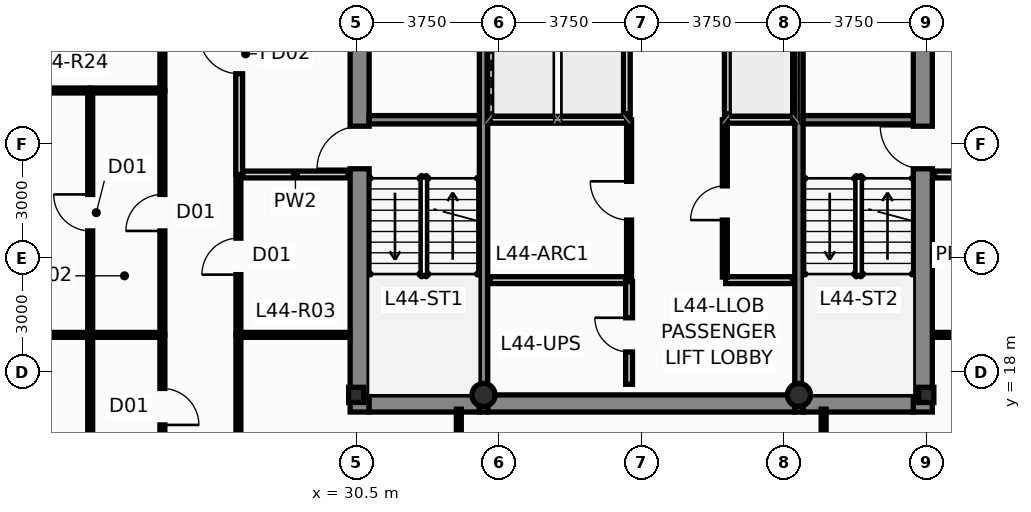
"""IFC4 building model, lengths in metres.
Left out: names, types, materials, properties, quantities, classifications, styles, units other than length and angle.
Written with IfcOpenShell. Run it as: python <this file> out.ifc"""

import sys

from ifc_helpers import new_model, si_unit, direction, frame, frame_2d, origin, origin_2d, place, context, subcontext, project, spatial, rectangle, hollow_circle, i_section, extrude, source, transform, mapped, element, fill, save


model = new_model("IFC4")
c1 = context("Model", 3, precision=1e-05, world=origin(), true_north=direction((0.0, 1.0)))
c2 = subcontext(c1, "Body", "Model", "MODEL_VIEW")
j1 = project(units=[si_unit("LENGTHUNIT", "METRE"), si_unit("PLANEANGLEUNIT", "RADIAN")], contexts=[c1])
p1 = place(None, origin())
s1 = spatial("IfcSite", under=j1, at=p1, CompositionType="ELEMENT")
p2 = place(p1, origin())
s2 = spatial("IfcBuilding", under=s1, at=p2, CompositionType="ELEMENT")
p3 = place(p2, frame((0.0, 0.0, 169.45)))
s3 = spatial("IfcBuildingStorey", under=s2, at=p3, CompositionType="ELEMENT", Elevation=169.45)
m1 = source(origin(), c2, "Body", "SweptSolid", [
    extrude(i_section(OverallWidth=0.4, OverallDepth=0.4, WebThickness=0.02, FlangeThickness=0.032, at=origin_2d()), origin(), (0.0, 0.0, 1.0), 3.65),
])
for number, where, z_axis, x_axis in (
    (1, (30.5, 17.4, 0.0), (0.0, 0.0, 1.0), (1.0, 0.0, 0.0)),
    (2, (45.5, 17.4, 0.0), (0.0, 0.0, 1.0), (1.0, 0.0, 0.0)),
):
    element("IfcColumn", number, at=place(p3, frame(where, z_axis=z_axis, x_axis=x_axis)), inside=s3, PredefinedType="COLUMN", context=c2, shape_type="MappedRepresentation", body=[
        mapped(m1, transform((0.0, 0.0, 0.0), scale=1.0)),
    ])
m2 = source(origin(), c2, "Body", "SweptSolid", [
    extrude(hollow_circle(Radius=0.305, WallThickness=0.025, at=origin_2d()), origin(), (0.0, 0.0, 1.0), 3.65),
])
for number, where, z_axis, x_axis in (
    (3, (33.85, 17.4, 0.0), (0.0, 0.0, 1.0), (1.0, 0.0, 0.0)),
    (4, (42.15, 17.4, 0.0), (0.0, 0.0, 1.0), (1.0, 0.0, 0.0)),
):
    element("IfcColumn", number, at=place(p3, frame(where, z_axis=z_axis, x_axis=x_axis)), inside=s3, PredefinedType="COLUMN", context=c2, shape_type="MappedRepresentation", body=[
        mapped(m2, transform((0.0, 0.0, 0.0), scale=1.0)),
    ])
p4 = place(p3, frame((30.59, 16.95, 0.0), z_axis=(0.0, 0.0, 1.0), x_axis=(0.0, 1.0, 0.0)))
e5 = element("IfcWall", 5, at=p4, inside=s3, PredefinedType="SHEAR", context=c2, shape_type="SweptSolid", body=[
    extrude(rectangle(XDim=13.275, YDim=0.5, at=frame_2d((6.638, 0.0))), origin(), (0.0, 0.0, 1.0), 3.65),
])
p5 = place(p4, frame((6.4, 0.0, 0.0)))
e6 = element("IfcOpeningElement", 6, at=p5, cuts=e5, PredefinedType="OPENING", context=c2, shape_type="SweptSolid", body=[
    extrude(rectangle(XDim=1.12, YDim=2.15, at=frame_2d((0.56, 1.075))), frame((0.0, 0.262, 0.0), z_axis=(0.0, -1.0, 0.0), x_axis=(1.0, 0.0, 0.0)), (0.0, 0.0, 1.0), 0.524),
])
p6 = place(p4, frame((10.85, 0.0, 0.0)))
e7 = element("IfcOpeningElement", 7, at=p6, cuts=e5, PredefinedType="OPENING", context=c2, shape_type="SweptSolid", body=[
    extrude(rectangle(XDim=1.2, YDim=2.2, at=frame_2d((0.6, 1.1))), frame((0.0, 0.262, 0.0), z_axis=(0.0, -1.0, 0.0), x_axis=(1.0, 0.0, 0.0)), (0.0, 0.0, 1.0), 0.524),
])
p7 = place(p3, frame((45.41, 16.95, 0.0), z_axis=(0.0, 0.0, 1.0), x_axis=(0.0, 1.0, 0.0)))
e8 = element("IfcWall", 8, at=p7, inside=s3, PredefinedType="SHEAR", context=c2, shape_type="SweptSolid", body=[
    extrude(rectangle(XDim=13.275, YDim=0.5, at=frame_2d((6.638, 0.0))), origin(), (0.0, 0.0, 1.0), 3.65),
])
p8 = place(p7, frame((6.4, 0.0, 0.0)))
e9 = element("IfcOpeningElement", 9, at=p8, cuts=e8, PredefinedType="OPENING", context=c2, shape_type="SweptSolid", body=[
    extrude(rectangle(XDim=1.12, YDim=2.15, at=frame_2d((0.56, 1.075))), frame((0.0, 0.262, 0.0), z_axis=(0.0, -1.0, 0.0), x_axis=(1.0, 0.0, 0.0)), (0.0, 0.0, 1.0), 0.524),
])
p9 = place(p7, frame((10.85, 0.0, 0.0)))
e10 = element("IfcOpeningElement", 10, at=p9, cuts=e8, PredefinedType="OPENING", context=c2, shape_type="SweptSolid", body=[
    extrude(rectangle(XDim=1.2, YDim=2.2, at=frame_2d((0.6, 1.1))), frame((0.0, 0.262, 0.0), z_axis=(0.0, -1.0, 0.0), x_axis=(1.0, 0.0, 0.0)), (0.0, 0.0, 1.0), 0.524),
])
p10 = place(p3, frame((30.84, 17.175, 0.0), z_axis=(0.0, 0.0, 1.0), x_axis=(1.0, 0.0, 0.0)))
e11 = element("IfcWall", 11, at=p10, inside=s3, PredefinedType="SHEAR", context=c2, shape_type="SweptSolid", body=[
    extrude(rectangle(XDim=2.9, YDim=0.45, at=frame_2d((1.45, 0.0))), origin(), (0.0, 0.0, 1.0), 3.65),
])
p11 = place(p3, frame((33.96, 17.175, 0.0), z_axis=(0.0, 0.0, 1.0), x_axis=(1.0, 0.0, 0.0)))
e12 = element("IfcWall", 12, at=p11, inside=s3, PredefinedType="SHEAR", context=c2, shape_type="SweptSolid", body=[
    extrude(rectangle(XDim=8.08, YDim=0.45, at=frame_2d((4.04, 0.0))), origin(), (0.0, 0.0, 1.0), 3.65),
])
p12 = place(p3, frame((42.26, 17.175, 0.0), z_axis=(0.0, 0.0, 1.0), x_axis=(1.0, 0.0, 0.0)))
e13 = element("IfcWall", 13, at=p12, inside=s3, PredefinedType="SHEAR", context=c2, shape_type="SweptSolid", body=[
    extrude(rectangle(XDim=2.9, YDim=0.45, at=frame_2d((1.45, 0.0))), origin(), (0.0, 0.0, 1.0), 3.65),
])
for number, where, z_axis, x_axis in (
    (14, (33.85, 16.95, 0.0), (0.0, 0.0, 1.0), (0.0, 1.0, 0.0)),
    (15, (42.15, 16.95, 0.0), (0.0, 0.0, 1.0), (0.0, 1.0, 0.0)),
):
    element("IfcWall", number, at=place(p3, frame(where, z_axis=z_axis, x_axis=x_axis)), inside=s3, PredefinedType="SHEAR", context=c2, shape_type="SweptSolid", body=[
        extrude(rectangle(XDim=13.275, YDim=0.22, at=frame_2d((6.638, 0.0))), origin(), (0.0, 0.0, 1.0), 3.65),
    ])
for number, where, z_axis, x_axis in (
    (16, (30.84, 24.64, 0.0), (0.0, 0.0, 1.0), (1.0, 0.0, 0.0)),
    (17, (42.26, 24.64, 0.0), (0.0, 0.0, 1.0), (1.0, 0.0, 0.0)),
):
    element("IfcWall", number, at=place(p3, frame(where, z_axis=z_axis, x_axis=x_axis)), inside=s3, PredefinedType="SHEAR", context=c2, shape_type="SweptSolid", body=[
        extrude(rectangle(XDim=2.9, YDim=0.22, at=frame_2d((1.45, 0.0))), origin(), (0.0, 0.0, 1.0), 3.65),
    ])
for number, where, z_axis, x_axis in (
    (18, (37.62, 24.8, 0.0), (0.0, 0.0, 1.0), (0.0, 1.0, 0.0)),
    (19, (40.28, 24.8, 0.0), (0.0, 0.0, 1.0), (0.0, 1.0, 0.0)),
):
    element("IfcWall", number, at=place(p3, frame(where, z_axis=z_axis, x_axis=x_axis)), inside=s3, PredefinedType="PARTITIONING", context=c2, shape_type="SweptSolid", body=[
        extrude(rectangle(XDim=2.0, YDim=0.18, at=frame_2d((1.0, 0.0))), origin(), (0.0, 0.0, 1.0), 3.4),
    ])
p13 = place(p3, frame((34.02, 24.64, 0.0), z_axis=(0.0, 0.0, 1.0), x_axis=(1.0, 0.0, 0.0)))
e20 = element("IfcWall", 20, at=p13, inside=s3, PredefinedType="PARTITIONING", context=c2, shape_type="SweptSolid", body=[
    extrude(rectangle(XDim=3.68, YDim=0.18, at=frame_2d((1.84, 0.0))), origin(), (0.0, 0.0, 1.0), 3.4),
])
p14 = place(p3, frame((40.2, 24.64, 0.0), z_axis=(0.0, 0.0, 1.0), x_axis=(1.0, 0.0, 0.0)))
e21 = element("IfcWall", 21, at=p14, inside=s3, PredefinedType="PARTITIONING", context=c2, shape_type="SweptSolid", body=[
    extrude(rectangle(XDim=1.78, YDim=0.18, at=frame_2d((0.89, 0.0))), origin(), (0.0, 0.0, 1.0), 3.4),
])
p15 = place(p3, frame((27.42, 23.2, 0.0), z_axis=(0.0, 0.0, 1.0), x_axis=(0.0, 1.0, 0.0)))
e22 = element("IfcWall", 22, at=p15, inside=s3, PredefinedType="PARTITIONING", context=c2, shape_type="SweptSolid", body=[
    extrude(rectangle(XDim=6.4, YDim=0.18, at=frame_2d((3.2, 0.0))), origin(), (0.0, 0.0, 1.0), 3.078),
])
p16 = place(p15, frame((2.65, 0.0, 0.0)))
e23 = element("IfcOpeningElement", 23, at=p16, cuts=e22, PredefinedType="OPENING", context=c2, shape_type="SweptSolid", body=[
    extrude(rectangle(XDim=1.05, YDim=2.15, at=frame_2d((0.525, 1.075))), frame((0.0, 0.102, 0.0), z_axis=(0.0, -1.0, 0.0), x_axis=(1.0, 0.0, 0.0)), (0.0, 0.0, 1.0), 0.204),
])
for number, where, z_axis, x_axis in (
    (24, (27.52, 23.2, 0.0), (0.0, 0.0, 1.0), (1.0, 0.0, 0.0)),
    (25, (45.72, 23.2, 0.0), (0.0, 0.0, 1.0), (1.0, 0.0, 0.0)),
):
    element("IfcWall", number, at=place(p3, frame(where, z_axis=z_axis, x_axis=x_axis)), inside=s3, PredefinedType="PARTITIONING", context=c2, shape_type="SweptSolid", body=[
        extrude(rectangle(XDim=2.76, YDim=0.18, at=frame_2d((1.38, 0.0))), origin(), (0.0, 0.0, 1.0), 3.4),
    ])
p17 = place(p3, frame((34.02, 20.42, 0.0), z_axis=(0.0, 0.0, 1.0), x_axis=(1.0, 0.0, 0.0)))
e26 = element("IfcWall", 26, at=p17, inside=s3, PredefinedType="PARTITIONING", context=c2, shape_type="SweptSolid", body=[
    extrude(rectangle(XDim=3.64, YDim=0.18, at=frame_2d((1.82, 0.0))), origin(), (0.0, 0.0, 1.0), 3.4),
])
p18 = place(p3, frame((40.22, 20.42, 0.0), z_axis=(0.0, 0.0, 1.0), x_axis=(1.0, 0.0, 0.0)))
e27 = element("IfcWall", 27, at=p18, inside=s3, PredefinedType="PARTITIONING", context=c2, shape_type="SweptSolid", body=[
    extrude(rectangle(XDim=1.76, YDim=0.18, at=frame_2d((0.88, 0.0))), origin(), (0.0, 0.0, 1.0), 3.4),
])
p19 = place(p3, frame((37.68, 20.5, 0.0), z_axis=(0.0, 0.0, 1.0), x_axis=(0.0, 1.0, 0.0)))
e28 = element("IfcWall", 28, at=p19, inside=s3, PredefinedType="PARTITIONING", context=c2, shape_type="SweptSolid", body=[
    extrude(rectangle(XDim=4.14, YDim=0.13, at=frame_2d((2.07, 0.0))), origin(), (0.0, 0.0, 1.0), 3.4),
])
p20 = place(p19, frame((1.5, 0.0, 0.0)))
e29 = element("IfcOpeningElement", 29, at=p20, cuts=e28, PredefinedType="OPENING", context=c2, shape_type="SweptSolid", body=[
    extrude(rectangle(XDim=1.02, YDim=2.15, at=frame_2d((0.51, 1.075))), frame((0.0, 0.077, 0.0), z_axis=(0.0, -1.0, 0.0), x_axis=(1.0, 0.0, 0.0)), (0.0, 0.0, 1.0), 0.154),
])
p21 = place(p3, frame((40.2, 20.5, 0.0), z_axis=(0.0, 0.0, 1.0), x_axis=(0.0, 1.0, 0.0)))
e30 = element("IfcWall", 30, at=p21, inside=s3, PredefinedType="PARTITIONING", context=c2, shape_type="SweptSolid", body=[
    extrude(rectangle(XDim=4.14, YDim=0.13, at=frame_2d((2.07, 0.0))), origin(), (0.0, 0.0, 1.0), 3.4),
])
p22 = place(p21, frame((1.5, 0.0, 0.0)))
e31 = element("IfcOpeningElement", 31, at=p22, cuts=e30, PredefinedType="OPENING", context=c2, shape_type="SweptSolid", body=[
    extrude(rectangle(XDim=0.9, YDim=2.1, at=frame_2d((0.45, 1.05))), frame((0.0, 0.077, 0.0), z_axis=(0.0, -1.0, 0.0), x_axis=(1.0, 0.0, 0.0)), (0.0, 0.0, 1.0), 0.154),
])
p23 = place(p3, frame((37.68, 17.68, 0.0), z_axis=(0.0, 0.0, 1.0), x_axis=(0.0, 1.0, 0.0)))
e32 = element("IfcWall", 32, at=p23, inside=s3, PredefinedType="PARTITIONING", context=c2, shape_type="SweptSolid", body=[
    extrude(rectangle(XDim=2.7, YDim=0.18, at=frame_2d((1.35, 0.0))), origin(), (0.0, 0.0, 1.0), 3.4),
])
p24 = place(p23, frame((0.85, 0.0, 0.0)))
e33 = element("IfcOpeningElement", 33, at=p24, cuts=e32, PredefinedType="OPENING", context=c2, shape_type="SweptSolid", body=[
    extrude(rectangle(XDim=0.9, YDim=2.1, at=frame_2d((0.45, 1.05))), frame((0.0, 0.102, 0.0), z_axis=(0.0, -1.0, 0.0), x_axis=(1.0, 0.0, 0.0)), (0.0, 0.0, 1.0), 0.204),
])
p25 = place(p3, frame((15.122, 18.98, 0.0), z_axis=(0.0, 0.0, 1.0), x_axis=(1.0, 0.0, 0.0)))
e34 = element("IfcWall", 34, at=p25, inside=s3, PredefinedType="PARTITIONING", context=c2, shape_type="SweptSolid", body=[
    extrude(rectangle(XDim=8.374, YDim=0.13, at=frame_2d((4.187, 0.0))), origin(), (0.0, 0.0, 1.0), 3.4),
])
p26 = place(p3, frame((45.675, 18.98, 0.0), z_axis=(0.0, 0.0, 1.0), x_axis=(1.0, 0.0, 0.0)))
e35 = element("IfcWall", 35, at=p26, inside=s3, PredefinedType="PARTITIONING", context=c2, shape_type="SweptSolid", body=[
    extrude(rectangle(XDim=6.82, YDim=0.13, at=frame_2d((3.41, 0.0))), origin(), (0.0, 0.0, 1.0), 3.4),
])
p27 = place(p3, frame((25.4, 18.985, 0.0), z_axis=(0.0, 0.0, 1.0), x_axis=(0.0, 1.0, 0.0)))
e36 = element("IfcWall", 36, at=p27, inside=s3, PredefinedType="PARTITIONING", context=c2, shape_type="SweptSolid", body=[
    extrude(rectangle(XDim=6.42, YDim=0.13, at=frame_2d((3.21, 0.0))), origin(), (0.0, 0.0, 1.0), 3.078),
])
p28 = place(p27, frame((2.73, 0.0, 0.0)))
e37 = element("IfcOpeningElement", 37, at=p28, cuts=e36, PredefinedType="OPENING", context=c2, shape_type="SweptSolid", body=[
    extrude(rectangle(XDim=0.96, YDim=2.15, at=frame_2d((0.48, 1.075))), frame((0.0, 0.077, 0.0), z_axis=(0.0, -1.0, 0.0), x_axis=(1.0, 0.0, 0.0)), (0.0, 0.0, 1.0), 0.154),
])
p29 = place(p3, frame((23.5, 18.985, 0.0), z_axis=(0.0, 0.0, 1.0), x_axis=(0.0, 1.0, 0.0)))
e38 = element("IfcWall", 38, at=p29, inside=s3, PredefinedType="PARTITIONING", context=c2, shape_type="SweptSolid", body=[
    extrude(rectangle(XDim=6.42, YDim=0.13, at=frame_2d((3.21, 0.0))), origin(), (0.0, 0.0, 1.0), 3.078),
])
p30 = place(p29, frame((2.73, 0.0, 0.0)))
e39 = element("IfcOpeningElement", 39, at=p30, cuts=e38, PredefinedType="OPENING", context=c2, shape_type="SweptSolid", body=[
    extrude(rectangle(XDim=0.96, YDim=2.15, at=frame_2d((0.48, 1.075))), frame((0.0, 0.077, 0.0), z_axis=(0.0, -1.0, 0.0), x_axis=(1.0, 0.0, 0.0)), (0.0, 0.0, 1.0), 0.154),
])
p31 = place(p3, frame((23.5, 12.555, 0.0), z_axis=(0.0, 0.0, 1.0), x_axis=(0.0, 1.0, 0.0)))
e40 = element("IfcWall", 40, at=p31, inside=s3, PredefinedType="PARTITIONING", context=c2, shape_type="SweptSolid", body=[
    extrude(rectangle(XDim=6.42, YDim=0.13, at=frame_2d((3.21, 0.0))), origin(), (0.0, 0.0, 1.0), 3.078),
])
p32 = place(p31, frame((2.73, 0.0, 0.0)))
e41 = element("IfcOpeningElement", 41, at=p32, cuts=e40, PredefinedType="OPENING", context=c2, shape_type="SweptSolid", body=[
    extrude(rectangle(XDim=0.96, YDim=2.15, at=frame_2d((0.48, 1.075))), frame((0.0, 0.077, 0.0), z_axis=(0.0, -1.0, 0.0), x_axis=(1.0, 0.0, 0.0)), (0.0, 0.0, 1.0), 0.154),
])
p33 = place(p3, frame((18.914, 25.41, 0.0), z_axis=(0.0, 0.0, 1.0), x_axis=(1.0, 0.0, 0.0)))
e42 = element("IfcWall", 42, at=p33, inside=s3, PredefinedType="PARTITIONING", context=c2, shape_type="SweptSolid", body=[
    extrude(rectangle(XDim=4.581, YDim=0.13, at=frame_2d((2.291, 0.0))), origin(), (0.0, 0.0, 1.0), 3.4),
])
p34 = place(p3, frame((25.4, 30.095, 0.0), z_axis=(0.0, 0.0, 1.0), x_axis=(0.0, -1.0, 0.0)))
e43 = element("IfcWall", 43, at=p34, inside=s3, PredefinedType="PARTITIONING", context=c2, shape_type="SweptSolid", body=[
    extrude(rectangle(XDim=4.68, YDim=0.13, at=frame_2d((2.34, 0.0))), origin(), (0.0, 0.0, 1.0), 3.078),
])
p35 = place(p34, frame((1.86, 0.0, 0.0)))
e44 = element("IfcOpeningElement", 44, at=p35, cuts=e43, PredefinedType="OPENING", context=c2, shape_type="SweptSolid", body=[
    extrude(rectangle(XDim=0.96, YDim=2.15, at=frame_2d((0.48, 1.075))), frame((0.0, 0.077, 0.0), z_axis=(0.0, -1.0, 0.0), x_axis=(1.0, 0.0, 0.0)), (0.0, 0.0, 1.0), 0.154),
])
for number, where, z_axis, x_axis in (
    (45, (33.2, 12.555, 0.0), (0.0, 0.0, 1.0), (0.0, 1.0, 0.0)),
    (46, (42.8, 12.555, 0.0), (0.0, 0.0, 1.0), (0.0, 1.0, 0.0)),
):
    element("IfcWall", number, at=place(p3, frame(where, z_axis=z_axis, x_axis=x_axis)), inside=s3, PredefinedType="PARTITIONING", context=c2, shape_type="SweptSolid", body=[
        extrude(rectangle(XDim=4.47, YDim=0.13, at=frame_2d((2.235, 0.0))), origin(), (0.0, 0.0, 1.0), 3.4),
    ])
p36 = place(p3, frame((27.4, 18.985, 0.0), z_axis=(0.0, 0.0, 1.0), x_axis=(0.0, 1.0, 0.0)))
e47 = element("IfcWall", 47, at=p36, inside=s3, PredefinedType="PARTITIONING", context=c2, shape_type="SweptSolid", body=[
    extrude(rectangle(XDim=4.12, YDim=0.13, at=frame_2d((2.06, 0.0))), origin(), (0.0, 0.0, 1.0), 3.4),
])
p37 = place(p36, frame((1.58, 0.0, 0.0)))
e48 = element("IfcOpeningElement", 48, at=p37, cuts=e47, PredefinedType="OPENING", context=c2, shape_type="SweptSolid", body=[
    extrude(rectangle(XDim=0.96, YDim=2.15, at=frame_2d((0.48, 1.075))), frame((0.0, 0.077, 0.0), z_axis=(0.0, -1.0, 0.0), x_axis=(1.0, 0.0, 0.0)), (0.0, 0.0, 1.0), 0.154),
])
p38 = place(p3, frame((25.4, 18.975, 0.0), z_axis=(0.0, 0.0, 1.0), x_axis=(0.0, -1.0, 0.0)))
e49 = element("IfcWall", 49, at=p38, inside=s3, PredefinedType="PARTITIONING", context=c2, shape_type="SweptSolid", body=[
    extrude(rectangle(XDim=3.77, YDim=0.13, at=frame_2d((1.885, 0.0))), origin(), (0.0, 0.0, 1.0), 3.078),
])
p39 = place(p38, frame((1.405, 0.0, 0.0)))
e50 = element("IfcOpeningElement", 50, at=p39, cuts=e49, PredefinedType="OPENING", context=c2, shape_type="SweptSolid", body=[
    extrude(rectangle(XDim=0.96, YDim=2.15, at=frame_2d((0.48, 1.075))), frame((0.0, 0.077, 0.0), z_axis=(0.0, -1.0, 0.0), x_axis=(1.0, 0.0, 0.0)), (0.0, 0.0, 1.0), 0.154),
])
p40 = place(p3, frame((27.4, 15.205, 0.0), z_axis=(0.0, 0.0, 1.0), x_axis=(0.0, 1.0, 0.0)))
e51 = element("IfcWall", 51, at=p40, inside=s3, PredefinedType="PARTITIONING", context=c2, shape_type="SweptSolid", body=[
    extrude(rectangle(XDim=3.77, YDim=0.13, at=frame_2d((1.885, 0.0))), origin(), (0.0, 0.0, 1.0), 3.4),
])
p41 = place(p3, frame((27.405, 18.98, 0.0), z_axis=(0.0, 0.0, 1.0), x_axis=(1.0, 0.0, 0.0)))
e52 = element("IfcWall", 52, at=p41, inside=s3, PredefinedType="PARTITIONING", context=c2, shape_type="SweptSolid", body=[
    extrude(rectangle(XDim=2.92, YDim=0.13, at=frame_2d((1.46, 0.0))), origin(), (0.0, 0.0, 1.0), 3.4),
])
for number, where, z_axis, x_axis in (
    (53, (23.505, 18.98, 0.0), (0.0, 0.0, 1.0), (1.0, 0.0, 0.0)),
    (54, (23.505, 25.41, 0.0), (0.0, 0.0, 1.0), (1.0, 0.0, 0.0)),
):
    element("IfcWall", number, at=place(p3, frame(where, z_axis=z_axis, x_axis=x_axis)), inside=s3, PredefinedType="PARTITIONING", context=c2, shape_type="SweptSolid", body=[
        extrude(rectangle(XDim=1.89, YDim=0.13, at=frame_2d((0.945, 0.0))), origin(), (0.0, 0.0, 1.0), 3.4),
    ])
p42 = place(p5, origin())
e55 = element("IfcDoor", 55, at=p42, inside=s3, OperationType="SINGLE_SWING_LEFT", PredefinedType="DOOR", context=c2, shape_type="SweptSolid", body=[
    extrude(rectangle(XDim=1.12, YDim=2.15, at=frame_2d((0.56, 1.075))), frame((0.0, 0.025, 0.0), z_axis=(0.0, -1.0, 0.0), x_axis=(1.0, 0.0, 0.0)), (0.0, 0.0, 1.0), 0.05),
])
fill(e6, e55)
p43 = place(p8, origin())
e56 = element("IfcDoor", 56, at=p43, inside=s3, OperationType="SINGLE_SWING_RIGHT", PredefinedType="DOOR", context=c2, shape_type="SweptSolid", body=[
    extrude(rectangle(XDim=1.12, YDim=2.15, at=frame_2d((0.56, 1.075))), frame((0.0, 0.025, 0.0), z_axis=(0.0, -1.0, 0.0), x_axis=(1.0, 0.0, 0.0)), (0.0, 0.0, 1.0), 0.05),
])
fill(e9, e56)
p44 = place(p16, origin())
e57 = element("IfcDoor", 57, at=p44, inside=s3, OperationType="SINGLE_SWING_RIGHT", PredefinedType="DOOR", context=c2, shape_type="SweptSolid", body=[
    extrude(rectangle(XDim=1.05, YDim=2.15, at=frame_2d((0.525, 1.075))), frame((0.0, 0.025, 0.0), z_axis=(0.0, -1.0, 0.0), x_axis=(1.0, 0.0, 0.0)), (0.0, 0.0, 1.0), 0.05),
])
fill(e23, e57)
p45 = place(p20, origin())
e58 = element("IfcDoor", 58, at=p45, inside=s3, OperationType="SINGLE_SWING_RIGHT", PredefinedType="DOOR", context=c2, shape_type="SweptSolid", body=[
    extrude(rectangle(XDim=1.02, YDim=2.15, at=frame_2d((0.51, 1.075))), frame((0.0, 0.025, 0.0), z_axis=(0.0, -1.0, 0.0), x_axis=(1.0, 0.0, 0.0)), (0.0, 0.0, 1.0), 0.05),
])
fill(e29, e58)
p46 = place(p22, origin())
e59 = element("IfcDoor", 59, at=p46, inside=s3, OperationType="SINGLE_SWING_LEFT", PredefinedType="DOOR", context=c2, shape_type="SweptSolid", body=[
    extrude(rectangle(XDim=0.9, YDim=2.1, at=frame_2d((0.45, 1.05))), frame((0.0, 0.025, 0.0), z_axis=(0.0, -1.0, 0.0), x_axis=(1.0, 0.0, 0.0)), (0.0, 0.0, 1.0), 0.05),
])
fill(e31, e59)
p47 = place(p24, origin())
e60 = element("IfcDoor", 60, at=p47, inside=s3, OperationType="SINGLE_SWING_RIGHT", PredefinedType="DOOR", context=c2, shape_type="SweptSolid", body=[
    extrude(rectangle(XDim=0.9, YDim=2.1, at=frame_2d((0.45, 1.05))), frame((0.0, 0.025, 0.0), z_axis=(0.0, -1.0, 0.0), x_axis=(1.0, 0.0, 0.0)), (0.0, 0.0, 1.0), 0.05),
])
fill(e33, e60)
p48 = place(p28, origin())
e61 = element("IfcDoor", 61, at=p48, inside=s3, OperationType="SINGLE_SWING_LEFT", PredefinedType="DOOR", context=c2, shape_type="SweptSolid", body=[
    extrude(rectangle(XDim=0.96, YDim=2.15, at=frame_2d((0.48, 1.075))), frame((0.0, 0.025, 0.0), z_axis=(0.0, -1.0, 0.0), x_axis=(1.0, 0.0, 0.0)), (0.0, 0.0, 1.0), 0.05),
])
fill(e37, e61)
p49 = place(p30, origin())
e62 = element("IfcDoor", 62, at=p49, inside=s3, OperationType="SINGLE_SWING_RIGHT", PredefinedType="DOOR", context=c2, shape_type="SweptSolid", body=[
    extrude(rectangle(XDim=0.96, YDim=2.15, at=frame_2d((0.48, 1.075))), frame((0.0, 0.025, 0.0), z_axis=(0.0, -1.0, 0.0), x_axis=(1.0, 0.0, 0.0)), (0.0, 0.0, 1.0), 0.05),
])
fill(e39, e62)
p50 = place(p37, origin())
e63 = element("IfcDoor", 63, at=p50, inside=s3, OperationType="SINGLE_SWING_LEFT", PredefinedType="DOOR", context=c2, shape_type="SweptSolid", body=[
    extrude(rectangle(XDim=0.96, YDim=2.15, at=frame_2d((0.48, 1.075))), frame((0.0, 0.025, 0.0), z_axis=(0.0, -1.0, 0.0), x_axis=(1.0, 0.0, 0.0)), (0.0, 0.0, 1.0), 0.05),
])
fill(e48, e63)
p51 = place(p39, origin())
e64 = element("IfcDoor", 64, at=p51, inside=s3, OperationType="SINGLE_SWING_RIGHT", PredefinedType="DOOR", context=c2, shape_type="SweptSolid", body=[
    extrude(rectangle(XDim=0.96, YDim=2.15, at=frame_2d((0.48, 1.075))), frame((0.0, 0.025, 0.0), z_axis=(0.0, -1.0, 0.0), x_axis=(1.0, 0.0, 0.0)), (0.0, 0.0, 1.0), 0.05),
])
fill(e50, e64)
save(model, sys.argv[1])
